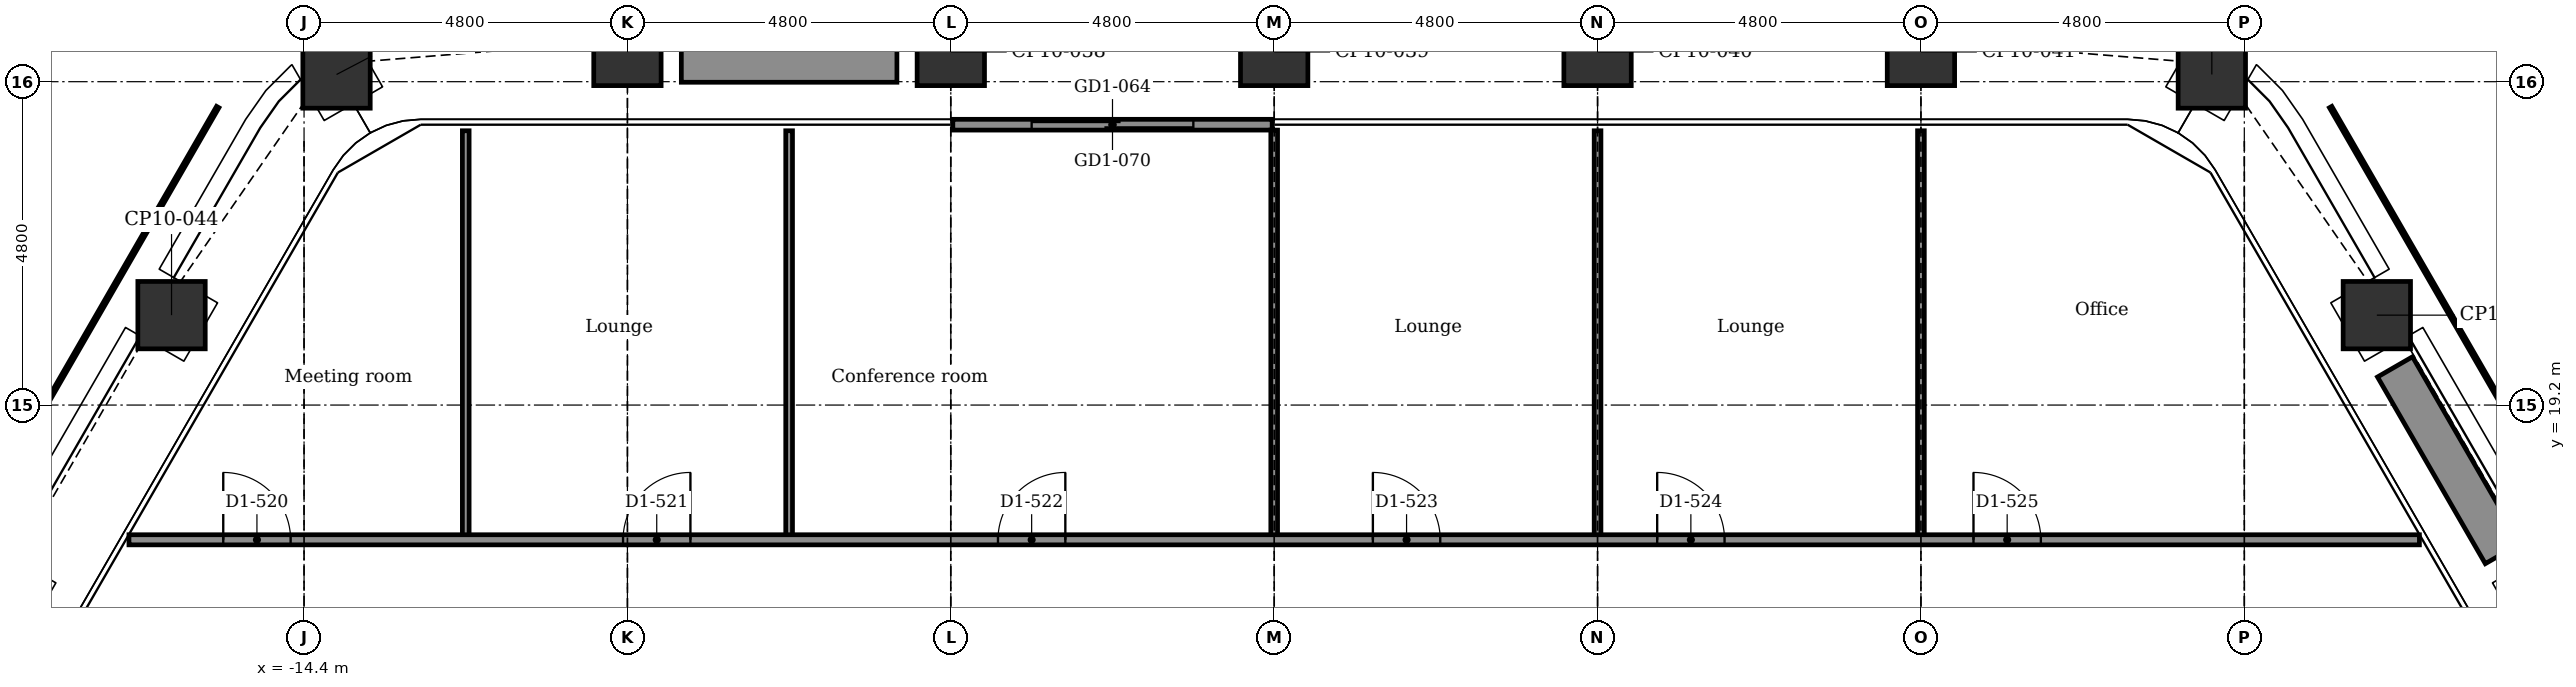
"""IFC4 building model, lengths in metres.
Left out: names, types, materials, properties, quantities, classifications, styles, units other than length and angle.
Written with IfcOpenShell. Run it as: python <this file> out.ifc"""

import sys

from ifc_helpers import new_model, si_unit, direction, frame, frame_2d, origin, origin_2d, place, context, subcontext, project, spatial, rectangle, extrude, element, fill, save


model = new_model("IFC4")
c1 = context("Model", 3, precision=1e-05, world=origin(), true_north=direction((0.0, 1.0)))
c2 = subcontext(c1, "Body", "Model", "MODEL_VIEW")
j1 = project(units=[si_unit("LENGTHUNIT", "METRE"), si_unit("PLANEANGLEUNIT", "RADIAN")], contexts=[c1])
p1 = place(None, origin())
s1 = spatial("IfcSite", under=j1, at=p1, CompositionType="ELEMENT")
p2 = place(p1, origin())
s2 = spatial("IfcBuilding", under=s1, at=p2, CompositionType="ELEMENT")
p3 = place(p2, frame((0.0, 0.0, 185.6)))
s3 = spatial("IfcBuildingStorey", under=s2, at=p3, CompositionType="ELEMENT", Elevation=185.6)
for number, where, z_axis, x_axis in (
    (1, (-13.918, 24.107, -0.15), (0.0, 0.0, 1.0), (0.866, 0.5, 0.0)),
    (2, (-9.6, 24.442, -0.15), (0.0, 0.0, 1.0), (1.0, 0.0, 0.0)),
    (3, (-4.8, 24.442, -0.15), (0.0, 0.0, 1.0), (1.0, 0.0, 0.0)),
    (4, (0.0, 24.442, -0.15), (0.0, 0.0, 1.0), (1.0, 0.0, 0.0)),
    (5, (4.8, 24.442, -0.15), (0.0, 0.0, 1.0), (1.0, 0.0, 0.0)),
    (6, (9.6, 24.442, -0.15), (0.0, 0.0, 1.0), (1.0, 0.0, 0.0)),
    (7, (13.918, 24.107, -0.15), (0.0, 0.0, 1.0), (0.5, 0.866, 0.0)),
    (8, (16.367, 20.535, -0.15), (0.0, 0.0, 1.0), (0.866, 0.5, 0.0)),
    (9, (18.767, 16.378, -0.15), (0.0, 0.0, 1.0), (0.866, 0.5, 0.0)),
    (10, (-18.767, 16.378, -0.15), (0.0, 0.0, 1.0), (0.5, 0.866, 0.0)),
    (11, (-16.367, 20.535, -0.15), (0.0, 0.0, 1.0), (0.5, 0.866, 0.0)),
):
    element("IfcColumn", number, at=place(p3, frame(where, z_axis=z_axis, x_axis=x_axis)), inside=s3, PredefinedType="COLUMN", context=c2, shape_type="SweptSolid", body=[
        extrude(rectangle(XDim=1.0, YDim=1.0, at=origin_2d()), origin(), (0.0, 0.0, 1.0), 3.9),
    ])
p4 = place(p3, frame((-4.77, 23.362, 0.0), z_axis=(0.0, 0.0, 1.0), x_axis=(1.0, 0.0, 0.0)))
e12 = element("IfcWall", 12, at=p4, inside=s3, PredefinedType="PARTITIONING", context=c2, shape_type="SweptSolid", body=[
    extrude(rectangle(XDim=4.74, YDim=0.16, at=frame_2d((2.37, 0.0))), origin(), (0.0, 0.0, 1.0), 3.75),
])
p5 = place(p4, frame((1.17, 0.0, 0.0)))
e13 = element("IfcOpeningElement", 13, at=p5, cuts=e12, PredefinedType="OPENING", context=c2, shape_type="SweptSolid", body=[
    extrude(rectangle(XDim=2.4, YDim=2.4, at=frame_2d((1.2, 1.2))), frame((0.0, 0.09, 0.0), z_axis=(0.0, -1.0, 0.0), x_axis=(1.0, 0.0, 0.0)), (0.0, 0.0, 1.0), 0.18),
])
for number, where, z_axis, x_axis in (
    (14, (-8.8, 24.292, 0.0), (0.0, 0.0, 1.0), (1.0, 0.0, 0.0)),
    (15, (16.637, 19.767, 0.0), (0.0, 0.0, 1.0), (0.5, -0.866, 0.0)),
):
    element("IfcWall", number, at=place(p3, frame(where, z_axis=z_axis, x_axis=x_axis)), inside=s3, PredefinedType="USERDEFINED", context=c2, shape_type="SweptSolid", body=[
        extrude(rectangle(XDim=3.2, YDim=0.6, at=frame_2d((1.6, 0.0))), origin(), (0.0, 0.0, 1.0), 0.7),
    ])
for number, where, z_axis, x_axis in (
    (16, (9.6, 17.2, 0.0), (0.0, 0.0, 1.0), (0.0, 1.0, 0.0)),
    (17, (4.8, 17.2, 0.0), (0.0, 0.0, 1.0), (0.0, 1.0, 0.0)),
):
    element("IfcWall", number, at=place(p3, frame(where, z_axis=z_axis, x_axis=x_axis)), inside=s3, PredefinedType="PARTITIONING", context=c2, shape_type="SweptSolid", body=[
        extrude(rectangle(XDim=6.072, YDim=0.1, at=frame_2d((3.036, 0.0))), origin(), (0.0, 0.0, 1.0), 3.066),
    ])
p6 = place(p3, frame((0.0, 17.2, 0.0), z_axis=(0.0, 0.0, 1.0), x_axis=(0.0, 1.0, 0.0)))
e18 = element("IfcWall", 18, at=p6, inside=s3, PredefinedType="PARTITIONING", context=c2, shape_type="SweptSolid", body=[
    extrude(rectangle(XDim=6.082, YDim=0.1, at=frame_2d((3.041, 0.0))), origin(), (0.0, 0.0, 1.0), 3.066),
])
for number, where, z_axis, x_axis in (
    (19, (-7.2, 17.2, 0.0), (0.0, 0.0, 1.0), (0.0, 1.0, 0.0)),
    (20, (-12.0, 17.2, 0.0), (0.0, 0.0, 1.0), (0.0, 1.0, 0.0)),
):
    element("IfcWall", number, at=place(p3, frame(where, z_axis=z_axis, x_axis=x_axis)), inside=s3, PredefinedType="PARTITIONING", context=c2, shape_type="SweptSolid", body=[
        extrude(rectangle(XDim=6.072, YDim=0.1, at=frame_2d((3.036, 0.0))), origin(), (0.0, 0.0, 1.0), 3.75),
    ])
p7 = place(p3, frame((-16.999, 17.2, 0.0), z_axis=(0.0, 0.0, 1.0), x_axis=(1.0, 0.0, 0.0)))
e21 = element("IfcWall", 21, at=p7, inside=s3, PredefinedType="PARTITIONING", context=c2, shape_type="SweptSolid", body=[
    extrude(rectangle(XDim=33.998, YDim=0.15, at=frame_2d((16.999, 0.0))), origin(), (0.0, 0.0, 1.0), 3.75),
])
p8 = place(p7, frame((1.4, 0.0, 0.0)))
e22 = element("IfcOpeningElement", 22, at=p8, cuts=e21, PredefinedType="OPENING", context=c2, shape_type="SweptSolid", body=[
    extrude(rectangle(XDim=1.0, YDim=2.1, at=frame_2d((0.5, 1.05))), frame((0.0, 0.085, 0.0), z_axis=(0.0, -1.0, 0.0), x_axis=(1.0, 0.0, 0.0)), (0.0, 0.0, 1.0), 0.17),
])
p9 = place(p7, frame((7.334, 0.0, 0.0)))
e23 = element("IfcOpeningElement", 23, at=p9, cuts=e21, PredefinedType="OPENING", context=c2, shape_type="SweptSolid", body=[
    extrude(rectangle(XDim=1.0, YDim=2.1, at=frame_2d((0.5, 1.05))), frame((0.0, 0.085, 0.0), z_axis=(0.0, -1.0, 0.0), x_axis=(1.0, 0.0, 0.0)), (0.0, 0.0, 1.0), 0.17),
])
p10 = place(p7, frame((12.899, 0.0, 0.0)))
e24 = element("IfcOpeningElement", 24, at=p10, cuts=e21, PredefinedType="OPENING", context=c2, shape_type="SweptSolid", body=[
    extrude(rectangle(XDim=1.0, YDim=2.1, at=frame_2d((0.5, 1.05))), frame((0.0, 0.085, 0.0), z_axis=(0.0, -1.0, 0.0), x_axis=(1.0, 0.0, 0.0)), (0.0, 0.0, 1.0), 0.17),
])
p11 = place(p7, frame((18.464, 0.0, 0.0)))
e25 = element("IfcOpeningElement", 25, at=p11, cuts=e21, PredefinedType="OPENING", context=c2, shape_type="SweptSolid", body=[
    extrude(rectangle(XDim=1.0, YDim=2.1, at=frame_2d((0.5, 1.05))), frame((0.0, 0.085, 0.0), z_axis=(0.0, -1.0, 0.0), x_axis=(1.0, 0.0, 0.0)), (0.0, 0.0, 1.0), 0.17),
])
p12 = place(p7, frame((22.684, 0.0, 0.0)))
e26 = element("IfcOpeningElement", 26, at=p12, cuts=e21, PredefinedType="OPENING", context=c2, shape_type="SweptSolid", body=[
    extrude(rectangle(XDim=1.0, YDim=2.1, at=frame_2d((0.5, 1.05))), frame((0.0, 0.085, 0.0), z_axis=(0.0, -1.0, 0.0), x_axis=(1.0, 0.0, 0.0)), (0.0, 0.0, 1.0), 0.17),
])
p13 = place(p7, frame((27.379, 0.0, 0.0)))
e27 = element("IfcOpeningElement", 27, at=p13, cuts=e21, PredefinedType="OPENING", context=c2, shape_type="SweptSolid", body=[
    extrude(rectangle(XDim=1.0, YDim=2.1, at=frame_2d((0.5, 1.05))), frame((0.0, 0.085, 0.0), z_axis=(0.0, -1.0, 0.0), x_axis=(1.0, 0.0, 0.0)), (0.0, 0.0, 1.0), 0.17),
])
p14 = place(p5, origin())
e28 = element("IfcDoor", 28, at=p14, inside=s3, OperationType="DOUBLE_DOOR_SLIDING", PredefinedType="DOOR", context=c2, shape_type="SweptSolid", body=[
    extrude(rectangle(XDim=2.4, YDim=2.4, at=frame_2d((1.2, 1.2))), frame((0.0, 0.025, 0.0), z_axis=(0.0, -1.0, 0.0), x_axis=(1.0, 0.0, 0.0)), (0.0, 0.0, 1.0), 0.05),
])
fill(e13, e28)
p15 = place(p8, origin())
e29 = element("IfcDoor", 29, at=p15, inside=s3, OperationType="SINGLE_SWING_LEFT", PredefinedType="DOOR", context=c2, shape_type="SweptSolid", body=[
    extrude(rectangle(XDim=1.0, YDim=2.1, at=frame_2d((0.5, 1.05))), frame((0.0, 0.025, 0.0), z_axis=(0.0, -1.0, 0.0), x_axis=(1.0, 0.0, 0.0)), (0.0, 0.0, 1.0), 0.05),
])
fill(e22, e29)
p16 = place(p9, origin())
e30 = element("IfcDoor", 30, at=p16, inside=s3, OperationType="SINGLE_SWING_RIGHT", PredefinedType="DOOR", context=c2, shape_type="SweptSolid", body=[
    extrude(rectangle(XDim=1.0, YDim=2.1, at=frame_2d((0.5, 1.05))), frame((0.0, 0.025, 0.0), z_axis=(0.0, -1.0, 0.0), x_axis=(1.0, 0.0, 0.0)), (0.0, 0.0, 1.0), 0.05),
])
fill(e23, e30)
p17 = place(p10, origin())
e31 = element("IfcDoor", 31, at=p17, inside=s3, OperationType="SINGLE_SWING_RIGHT", PredefinedType="DOOR", context=c2, shape_type="SweptSolid", body=[
    extrude(rectangle(XDim=1.0, YDim=2.1, at=frame_2d((0.5, 1.05))), frame((0.0, 0.025, 0.0), z_axis=(0.0, -1.0, 0.0), x_axis=(1.0, 0.0, 0.0)), (0.0, 0.0, 1.0), 0.05),
])
fill(e24, e31)
p18 = place(p11, origin())
e32 = element("IfcDoor", 32, at=p18, inside=s3, OperationType="SINGLE_SWING_LEFT", PredefinedType="DOOR", context=c2, shape_type="SweptSolid", body=[
    extrude(rectangle(XDim=1.0, YDim=2.1, at=frame_2d((0.5, 1.05))), frame((0.0, 0.025, 0.0), z_axis=(0.0, -1.0, 0.0), x_axis=(1.0, 0.0, 0.0)), (0.0, 0.0, 1.0), 0.05),
])
fill(e25, e32)
p19 = place(p12, origin())
e33 = element("IfcDoor", 33, at=p19, inside=s3, OperationType="SINGLE_SWING_LEFT", PredefinedType="DOOR", context=c2, shape_type="SweptSolid", body=[
    extrude(rectangle(XDim=1.0, YDim=2.1, at=frame_2d((0.5, 1.05))), frame((0.0, 0.025, 0.0), z_axis=(0.0, -1.0, 0.0), x_axis=(1.0, 0.0, 0.0)), (0.0, 0.0, 1.0), 0.05),
])
fill(e26, e33)
p20 = place(p13, origin())
e34 = element("IfcDoor", 34, at=p20, inside=s3, OperationType="SINGLE_SWING_LEFT", PredefinedType="DOOR", context=c2, shape_type="SweptSolid", body=[
    extrude(rectangle(XDim=1.0, YDim=2.1, at=frame_2d((0.5, 1.05))), frame((0.0, 0.025, 0.0), z_axis=(0.0, -1.0, 0.0), x_axis=(1.0, 0.0, 0.0)), (0.0, 0.0, 1.0), 0.05),
])
fill(e27, e34)
save(model, sys.argv[1])
